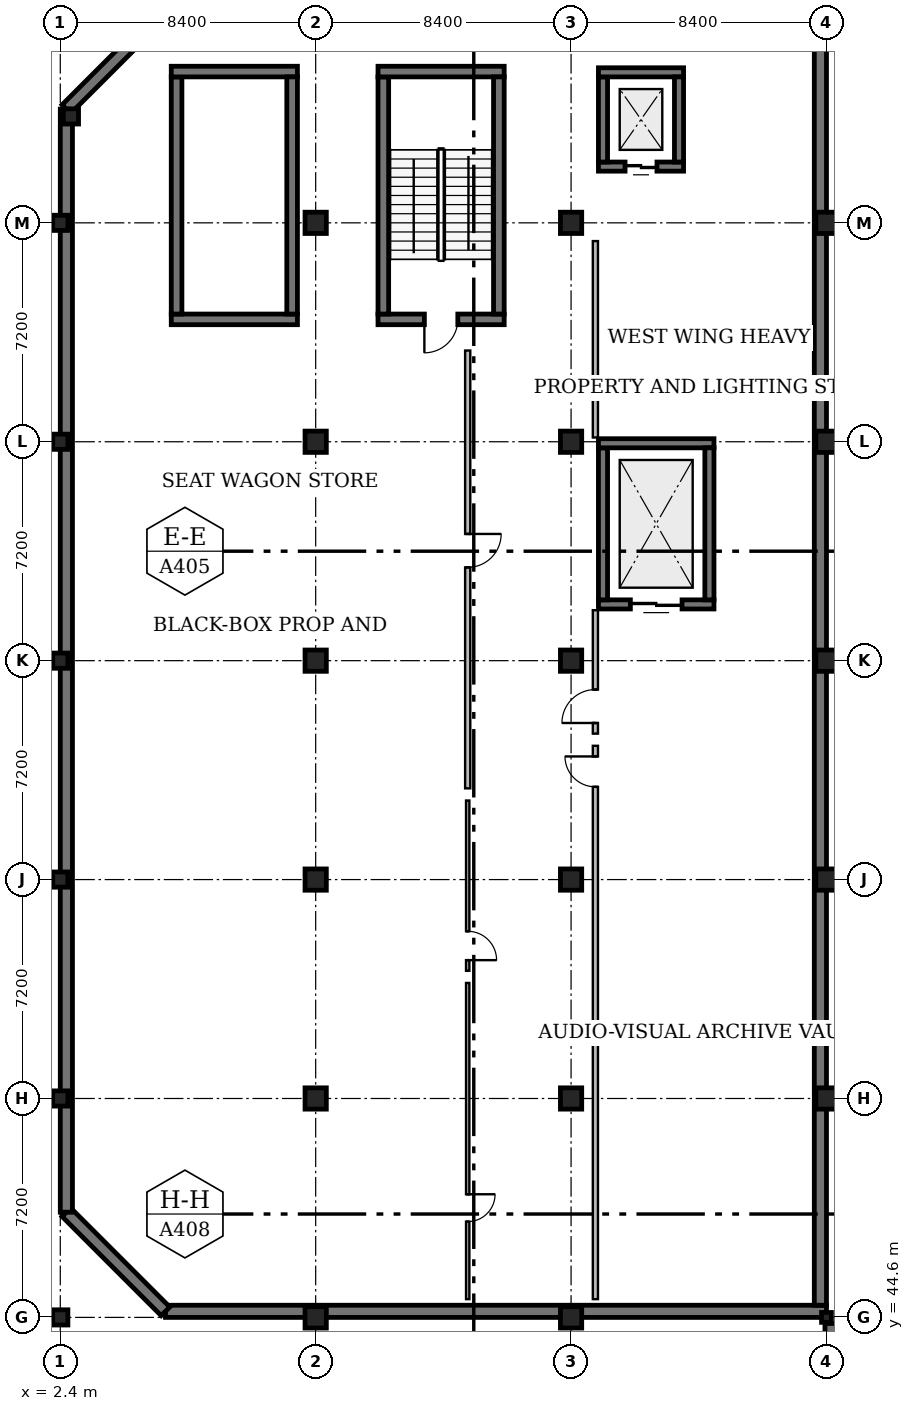
"""IFC4 building model, lengths in metres.
Left out: names, types, materials, properties, quantities, classifications, styles, units other than length and angle.
Written with IfcOpenShell. Run it as: python <this file> out.ifc"""

import sys

from ifc_helpers import new_model, si_unit, direction, frame, frame_2d, origin, origin_2d, place, context, subcontext, project, spatial, rectangle, hollow_circle, extrude, element, fill, save


model = new_model("IFC4")
c1 = context("Model", 3, precision=1e-05, world=origin(), true_north=direction((0.0, 1.0)))
c2 = subcontext(c1, "Body", "Model", "MODEL_VIEW")
j1 = project(units=[si_unit("LENGTHUNIT", "METRE"), si_unit("PLANEANGLEUNIT", "RADIAN")], contexts=[c1])
p1 = place(None, origin())
s1 = spatial("IfcSite", under=j1, at=p1, CompositionType="ELEMENT")
p2 = place(p1, origin())
s2 = spatial("IfcBuilding", under=s1, at=p2, CompositionType="ELEMENT")
p3 = place(p2, frame((0.0, 0.0, -4.8)))
s3 = spatial("IfcBuildingStorey", under=s2, at=p3, CompositionType="ELEMENT", Elevation=-4.8)
for number, where, z_axis, x_axis in (
    (1, (2.4, 44.6, 0.0), (0.0, 0.0, 1.0), (1.0, 0.0, 0.0)),
    (2, (2.4, 51.8, 0.0), (0.0, 0.0, 1.0), (1.0, 0.0, 0.0)),
    (3, (2.4, 59.0, 0.0), (0.0, 0.0, 1.0), (1.0, 0.0, 0.0)),
    (4, (2.4, 66.2, 0.0), (0.0, 0.0, 1.0), (1.0, 0.0, 0.0)),
    (5, (2.4, 73.4, 0.0), (0.0, 0.0, 1.0), (1.0, 0.0, 0.0)),
    (6, (2.4, 80.6, 0.0), (0.0, 0.0, 1.0), (1.0, 0.0, 0.0)),
):
    element("IfcColumn", number, at=place(p3, frame(where, z_axis=z_axis, x_axis=x_axis)), inside=s3, PredefinedType="COLUMN", context=c2, shape_type="SweptSolid", body=[
        extrude(rectangle(XDim=0.5, YDim=0.5, at=origin_2d()), origin(), (0.0, 0.0, 1.0), 4.8),
    ])
for number, where, z_axis, x_axis in (
    (7, (10.8, 44.6, 0.0), (0.0, 0.0, 1.0), (1.0, 0.0, 0.0)),
    (8, (10.8, 51.8, 0.0), (0.0, 0.0, 1.0), (1.0, 0.0, 0.0)),
    (9, (10.8, 59.0, 0.0), (0.0, 0.0, 1.0), (1.0, 0.0, 0.0)),
    (10, (10.8, 66.2, 0.0), (0.0, 0.0, 1.0), (1.0, 0.0, 0.0)),
    (11, (10.8, 73.4, 0.0), (0.0, 0.0, 1.0), (1.0, 0.0, 0.0)),
    (12, (10.8, 80.6, 0.0), (0.0, 0.0, 1.0), (1.0, 0.0, 0.0)),
    (13, (19.2, 44.6, 0.0), (0.0, 0.0, 1.0), (1.0, 0.0, 0.0)),
    (14, (19.2, 51.8, 0.0), (0.0, 0.0, 1.0), (1.0, 0.0, 0.0)),
    (15, (19.2, 59.0, 0.0), (0.0, 0.0, 1.0), (1.0, 0.0, 0.0)),
    (16, (19.2, 66.2, 0.0), (0.0, 0.0, 1.0), (1.0, 0.0, 0.0)),
    (17, (19.2, 73.4, 0.0), (0.0, 0.0, 1.0), (1.0, 0.0, 0.0)),
    (18, (19.2, 80.6, 0.0), (0.0, 0.0, 1.0), (1.0, 0.0, 0.0)),
):
    element("IfcColumn", number, at=place(p3, frame(where, z_axis=z_axis, x_axis=x_axis)), inside=s3, PredefinedType="COLUMN", context=c2, shape_type="SweptSolid", body=[
        extrude(rectangle(XDim=0.7, YDim=0.7, at=origin_2d()), origin(), (0.0, 0.0, 1.0), 4.8),
    ])
p4 = place(p3, frame((27.6, 44.6, 0.0), z_axis=(0.0, 0.0, 1.0), x_axis=(1.0, 0.0, 0.0)))
e19 = element("IfcColumn", 19, at=p4, inside=s3, PredefinedType="COLUMN", context=c2, shape_type="SweptSolid", body=[
    extrude(hollow_circle(Radius=0.162, WallThickness=0.012, at=origin_2d()), origin(), (0.0, 0.0, 1.0), 4.8),
])
for number, where, z_axis, x_axis in (
    (20, (27.6, 51.8, 0.0), (0.0, 0.0, 1.0), (1.0, 0.0, 0.0)),
    (21, (27.6, 59.0, 0.0), (0.0, 0.0, 1.0), (1.0, 0.0, 0.0)),
    (22, (27.6, 66.2, 0.0), (0.0, 0.0, 1.0), (1.0, 0.0, 0.0)),
    (23, (27.6, 73.4, 0.0), (0.0, 0.0, 1.0), (1.0, 0.0, 0.0)),
    (24, (27.6, 80.6, 0.0), (0.0, 0.0, 1.0), (1.0, 0.0, 0.0)),
):
    element("IfcColumn", number, at=place(p3, frame(where, z_axis=z_axis, x_axis=x_axis)), inside=s3, PredefinedType="COLUMN", context=c2, shape_type="SweptSolid", body=[
        extrude(rectangle(XDim=0.7, YDim=0.7, at=origin_2d()), origin(), (0.0, 0.0, 1.0), 4.8),
    ])
p5 = place(p3, frame((2.75, 84.1, 0.0), z_axis=(0.0, 0.0, 1.0), x_axis=(1.0, 0.0, 0.0)))
e25 = element("IfcColumn", 25, at=p5, inside=s3, PredefinedType="COLUMN", context=c2, shape_type="SweptSolid", body=[
    extrude(rectangle(XDim=0.5, YDim=0.5, at=origin_2d()), origin(), (0.0, 0.0, 1.0), 4.8),
])
p6 = place(p3, frame((10.2, 77.425, 0.0), z_axis=(0.0, 0.0, 1.0), x_axis=(-1.0, 0.0, 0.0)))
e26 = element("IfcWall", 26, at=p6, inside=s3, PredefinedType="SOLIDWALL", context=c2, shape_type="SweptSolid", body=[
    extrude(rectangle(XDim=4.15, YDim=0.35, at=frame_2d((2.075, 0.0))), origin(), (0.0, 0.0, 1.0), 4.54),
])
p7 = place(p3, frame((6.225, 77.6, 0.0), z_axis=(0.0, 0.0, 1.0), x_axis=(0.0, 1.0, 0.0)))
e27 = element("IfcWall", 27, at=p7, inside=s3, PredefinedType="SOLIDWALL", context=c2, shape_type="SweptSolid", body=[
    extrude(rectangle(XDim=7.8, YDim=0.35, at=frame_2d((3.9, 0.0))), origin(), (0.0, 0.0, 1.0), 4.54),
])
p8 = place(p3, frame((6.05, 85.575, 0.0), z_axis=(0.0, 0.0, 1.0), x_axis=(1.0, 0.0, 0.0)))
e28 = element("IfcWall", 28, at=p8, inside=s3, PredefinedType="SOLIDWALL", context=c2, shape_type="SweptSolid", body=[
    extrude(rectangle(XDim=4.15, YDim=0.35, at=frame_2d((2.075, 0.0))), origin(), (0.0, 0.0, 1.0), 4.54),
])
p9 = place(p3, frame((10.025, 85.4, 0.0), z_axis=(0.0, 0.0, 1.0), x_axis=(0.0, -1.0, 0.0)))
e29 = element("IfcWall", 29, at=p9, inside=s3, PredefinedType="SOLIDWALL", context=c2, shape_type="SweptSolid", body=[
    extrude(rectangle(XDim=7.8, YDim=0.35, at=frame_2d((3.9, 0.0))), origin(), (0.0, 0.0, 1.0), 4.54),
])
p10 = place(p3, frame((17.0, 77.425, 0.0), z_axis=(0.0, 0.0, 1.0), x_axis=(-1.0, 0.0, 0.0)))
e30 = element("IfcWall", 30, at=p10, inside=s3, PredefinedType="SOLIDWALL", context=c2, shape_type="SweptSolid", body=[
    extrude(rectangle(XDim=4.15, YDim=0.35, at=frame_2d((2.075, 0.0))), origin(), (0.0, 0.0, 1.0), 4.56),
])
p11 = place(p10, frame((1.525, 0.0, 0.0)))
e31 = element("IfcOpeningElement", 31, at=p11, cuts=e30, PredefinedType="OPENING", context=c2, shape_type="SweptSolid", body=[
    extrude(rectangle(XDim=1.1, YDim=2.15, at=frame_2d((0.55, 1.075))), frame((0.0, 0.195, 0.0), z_axis=(0.0, -1.0, 0.0), x_axis=(1.0, 0.0, 0.0)), (0.0, 0.0, 1.0), 0.39),
])
p12 = place(p3, frame((13.025, 77.6, 0.0), z_axis=(0.0, 0.0, 1.0), x_axis=(0.0, 1.0, 0.0)))
e32 = element("IfcWall", 32, at=p12, inside=s3, PredefinedType="SOLIDWALL", context=c2, shape_type="SweptSolid", body=[
    extrude(rectangle(XDim=7.8, YDim=0.35, at=frame_2d((3.9, 0.0))), origin(), (0.0, 0.0, 1.0), 4.56),
])
p13 = place(p3, frame((12.85, 85.575, 0.0), z_axis=(0.0, 0.0, 1.0), x_axis=(1.0, 0.0, 0.0)))
e33 = element("IfcWall", 33, at=p13, inside=s3, PredefinedType="SOLIDWALL", context=c2, shape_type="SweptSolid", body=[
    extrude(rectangle(XDim=4.15, YDim=0.35, at=frame_2d((2.075, 0.0))), origin(), (0.0, 0.0, 1.0), 4.56),
])
p14 = place(p3, frame((16.825, 85.4, 0.0), z_axis=(0.0, 0.0, 1.0), x_axis=(0.0, -1.0, 0.0)))
e34 = element("IfcWall", 34, at=p14, inside=s3, PredefinedType="SOLIDWALL", context=c2, shape_type="SweptSolid", body=[
    extrude(rectangle(XDim=7.8, YDim=0.35, at=frame_2d((3.9, 0.0))), origin(), (0.0, 0.0, 1.0), 4.56),
])
p15 = place(p3, frame((22.9, 82.45, 0.0), z_axis=(0.0, 0.0, 1.0), x_axis=(-1.0, 0.0, 0.0)))
e35 = element("IfcWall", 35, at=p15, inside=s3, PredefinedType="SOLIDWALL", context=c2, shape_type="SweptSolid", body=[
    extrude(rectangle(XDim=2.8, YDim=0.3, at=frame_2d((1.4, 0.0))), origin(), (0.0, 0.0, 1.0), 4.8),
])
p16 = place(p15, frame((0.875, 0.0, 0.0)))
e36 = element("IfcOpeningElement", 36, at=p16, cuts=e35, PredefinedType="OPENING", context=c2, shape_type="SweptSolid", body=[
    extrude(rectangle(XDim=1.05, YDim=2.15, at=frame_2d((0.525, 1.075))), frame((0.0, 0.17, 0.0), z_axis=(0.0, -1.0, 0.0), x_axis=(1.0, 0.0, 0.0)), (0.0, 0.0, 1.0), 0.34),
])
for number, where, z_axis, x_axis in (
    (37, (20.25, 82.6, 0.0), (0.0, 0.0, 1.0), (0.0, 1.0, 0.0)),
    (38, (20.1, 85.55, 0.0), (0.0, 0.0, 1.0), (1.0, 0.0, 0.0)),
    (39, (22.75, 85.4, 0.0), (0.0, 0.0, 1.0), (0.0, -1.0, 0.0)),
):
    element("IfcWall", number, at=place(p3, frame(where, z_axis=z_axis, x_axis=x_axis)), inside=s3, PredefinedType="SOLIDWALL", context=c2, shape_type="SweptSolid", body=[
        extrude(rectangle(XDim=2.8, YDim=0.3, at=frame_2d((1.4, 0.0))), origin(), (0.0, 0.0, 1.0), 4.8),
    ])
p17 = place(p3, frame((23.9, 68.05, 0.0), z_axis=(0.0, 0.0, 1.0), x_axis=(-1.0, 0.0, 0.0)))
e40 = element("IfcWall", 40, at=p17, inside=s3, PredefinedType="SOLIDWALL", context=c2, shape_type="SweptSolid", body=[
    extrude(rectangle(XDim=3.8, YDim=0.3, at=frame_2d((1.9, 0.0))), origin(), (0.0, 0.0, 1.0), 4.8),
])
p18 = place(p17, frame((1.05, 0.0, 0.0)))
e41 = element("IfcOpeningElement", 41, at=p18, cuts=e40, PredefinedType="OPENING", context=c2, shape_type="SweptSolid", body=[
    extrude(rectangle(XDim=1.7, YDim=2.4, at=frame_2d((0.85, 1.2))), frame((0.0, 0.17, 0.0), z_axis=(0.0, -1.0, 0.0), x_axis=(1.0, 0.0, 0.0)), (0.0, 0.0, 1.0), 0.34),
])
p19 = place(p3, frame((20.25, 68.2, 0.0), z_axis=(0.0, 0.0, 1.0), x_axis=(0.0, 1.0, 0.0)))
e42 = element("IfcWall", 42, at=p19, inside=s3, PredefinedType="SOLIDWALL", context=c2, shape_type="SweptSolid", body=[
    extrude(rectangle(XDim=5.0, YDim=0.3, at=frame_2d((2.5, 0.0))), origin(), (0.0, 0.0, 1.0), 4.8),
])
p20 = place(p3, frame((20.1, 73.35, 0.0), z_axis=(0.0, 0.0, 1.0), x_axis=(1.0, 0.0, 0.0)))
e43 = element("IfcWall", 43, at=p20, inside=s3, PredefinedType="SOLIDWALL", context=c2, shape_type="SweptSolid", body=[
    extrude(rectangle(XDim=3.8, YDim=0.3, at=frame_2d((1.9, 0.0))), origin(), (0.0, 0.0, 1.0), 4.8),
])
p21 = place(p3, frame((23.75, 73.2, 0.0), z_axis=(0.0, 0.0, 1.0), x_axis=(0.0, -1.0, 0.0)))
e44 = element("IfcWall", 44, at=p21, inside=s3, PredefinedType="SOLIDWALL", context=c2, shape_type="SweptSolid", body=[
    extrude(rectangle(XDim=5.0, YDim=0.3, at=frame_2d((2.5, 0.0))), origin(), (0.0, 0.0, 1.0), 4.8),
])
p22 = place(p3, frame((27.75, 1.58, 0.0), z_axis=(0.0, 0.0, 1.0), x_axis=(0.0, 1.0, 0.0)))
e45 = element("IfcWall", 45, at=p22, inside=s3, PredefinedType="SOLIDWALL", context=c2, shape_type="SweptSolid", body=[
    extrude(rectangle(XDim=42.82, YDim=0.4, at=frame_2d((21.41, 0.0))), origin(), (0.0, 0.0, 1.0), 4.63),
])
p23 = place(p3, frame((5.86, 44.8, 0.0), z_axis=(0.0, 0.0, 1.0), x_axis=(1.0, 0.0, 0.0)))
e46 = element("IfcWall", 46, at=p23, inside=s3, PredefinedType="SOLIDWALL", context=c2, shape_type="SweptSolid", body=[
    extrude(rectangle(XDim=21.74, YDim=0.4, at=frame_2d((10.87, 0.0))), origin(), (0.0, 0.0, 1.0), 4.48),
])
p24 = place(p3, frame((2.6, 48.06, 0.0), z_axis=(0.0, 0.0, 1.0), x_axis=(0.707106781187, -0.707106781187, 0.0)))
e47 = element("IfcWall", 47, at=p24, inside=s3, PredefinedType="SOLIDWALL", context=c2, shape_type="SweptSolid", body=[
    extrude(rectangle(XDim=4.61, YDim=0.4, at=frame_2d((2.305, 0.0))), origin(), (0.0, 0.0, 1.0), 4.48),
])
p25 = place(p3, frame((2.6, 48.06, 0.0), z_axis=(0.0, 0.0, 1.0), x_axis=(0.0, 1.0, 0.0)))
e48 = element("IfcWall", 48, at=p25, inside=s3, PredefinedType="SOLIDWALL", context=c2, shape_type="SweptSolid", body=[
    extrude(rectangle(XDim=36.28, YDim=0.4, at=frame_2d((18.14, 0.0))), origin(), (0.0, 0.0, 1.0), 4.48),
])
p26 = place(p3, frame((2.6, 84.34, 0.0), z_axis=(0.0, 0.0, 1.0), x_axis=(0.707106781187, 0.707106781187, 0.0)))
e49 = element("IfcWall", 49, at=p26, inside=s3, PredefinedType="SOLIDWALL", context=c2, shape_type="SweptSolid", body=[
    extrude(rectangle(XDim=4.61, YDim=0.4, at=frame_2d((2.305, 0.0))), origin(), (0.0, 0.0, 1.0), 4.48),
])
p27 = place(p3, frame((27.4, 45.0, 0.0), z_axis=(0.0, 0.0, 1.0), x_axis=(0.0, 1.0, 0.0)))
e50 = element("IfcWall", 50, at=p27, inside=s3, PredefinedType="SOLIDWALL", context=c2, shape_type="SweptSolid", body=[
    extrude(rectangle(XDim=42.4, YDim=0.4, at=frame_2d((21.2, 0.0))), origin(), (0.0, 0.0, 1.0), 4.48),
])
p28 = place(p3, frame((15.8, 55.6, 0.0), z_axis=(0.0, 0.0, 1.0), x_axis=(0.0, -1.0, 0.0)))
e51 = element("IfcWall", 51, at=p28, inside=s3, PredefinedType="PARTITIONING", context=c2, shape_type="SweptSolid", body=[
    extrude(rectangle(XDim=10.4, YDim=0.11, at=frame_2d((5.2, 0.0))), origin(), (0.0, 0.0, 1.0), 4.54),
])
p29 = place(p28, frame((6.95, 0.0, 0.0)))
e52 = element("IfcOpeningElement", 52, at=p29, cuts=e51, PredefinedType="OPENING", context=c2, shape_type="SweptSolid", body=[
    extrude(rectangle(XDim=0.9, YDim=2.15, at=frame_2d((0.45, 1.075))), frame((0.0, 0.075, 0.0), z_axis=(0.0, -1.0, 0.0), x_axis=(1.0, 0.0, 0.0)), (0.0, 0.0, 1.0), 0.15),
])
p30 = place(p3, frame((15.8, 61.6, 0.0), z_axis=(0.0, 0.0, 1.0), x_axis=(0.0, -1.0, 0.0)))
e53 = element("IfcWall", 53, at=p30, inside=s3, PredefinedType="PARTITIONING", context=c2, shape_type="SweptSolid", body=[
    extrude(rectangle(XDim=5.6, YDim=0.11, at=frame_2d((2.8, 0.0))), origin(), (0.0, 0.0, 1.0), 4.54),
])
p31 = place(p30, frame((4.3, 0.0, 0.0)))
e54 = element("IfcOpeningElement", 54, at=p31, cuts=e53, PredefinedType="OPENING", context=c2, shape_type="SweptSolid", body=[
    extrude(rectangle(XDim=0.95, YDim=2.1, at=frame_2d((0.475, 1.05))), frame((0.0, 0.075, 0.0), z_axis=(0.0, -1.0, 0.0), x_axis=(1.0, 0.0, 0.0)), (0.0, 0.0, 1.0), 0.15),
])
p32 = place(p3, frame((15.8, 76.4, 0.0), z_axis=(0.0, 0.0, 1.0), x_axis=(0.0, -1.0, 0.0)))
e55 = element("IfcWall", 55, at=p32, inside=s3, PredefinedType="PARTITIONING", context=c2, shape_type="SweptSolid", body=[
    extrude(rectangle(XDim=14.4, YDim=0.17, at=frame_2d((7.2, 0.0))), origin(), (0.0, 0.0, 1.0), 4.54),
])
p33 = place(p32, frame((6.032, 0.0, 0.0)))
e56 = element("IfcOpeningElement", 56, at=p33, cuts=e55, PredefinedType="OPENING", context=c2, shape_type="SweptSolid", body=[
    extrude(rectangle(XDim=1.1, YDim=2.1, at=frame_2d((0.55, 1.05))), frame((0.0, 0.105, 0.0), z_axis=(0.0, -1.0, 0.0), x_axis=(1.0, 0.0, 0.0)), (0.0, 0.0, 1.0), 0.21),
])
p34 = place(p3, frame((20.0, 45.2, 0.0), z_axis=(0.0, 0.0, 1.0), x_axis=(0.0, 1.0, 0.0)))
e57 = element("IfcWall", 57, at=p34, inside=s3, PredefinedType="PARTITIONING", context=c2, shape_type="SweptSolid", body=[
    extrude(rectangle(XDim=18.2, YDim=0.17, at=frame_2d((9.1, 0.0))), origin(), (0.0, 0.0, 1.0), 4.54),
])
p35 = place(p34, frame((16.85, 0.0, 0.0)))
e58 = element("IfcOpeningElement", 58, at=p35, cuts=e57, PredefinedType="OPENING", context=c2, shape_type="SweptSolid", body=[
    extrude(rectangle(XDim=1.0, YDim=2.2, at=frame_2d((0.5, 1.1))), frame((0.0, 0.105, 0.0), z_axis=(0.0, -1.0, 0.0), x_axis=(1.0, 0.0, 0.0)), (0.0, 0.0, 1.0), 0.21),
])
p36 = place(p3, frame((20.0, 63.8, 0.0), z_axis=(0.0, 0.0, 1.0), x_axis=(0.0, 1.0, 0.0)))
e59 = element("IfcWall", 59, at=p36, inside=s3, PredefinedType="PARTITIONING", context=c2, shape_type="SweptSolid", body=[
    extrude(rectangle(XDim=4.06, YDim=0.17, at=frame_2d((2.03, 0.0))), origin(), (0.0, 0.0, 1.0), 4.54),
])
p37 = place(p36, frame((0.35, 0.0, 0.0)))
e60 = element("IfcOpeningElement", 60, at=p37, cuts=e59, PredefinedType="OPENING", context=c2, shape_type="SweptSolid", body=[
    extrude(rectangle(XDim=1.1, YDim=2.1, at=frame_2d((0.55, 1.05))), frame((0.0, 0.105, 0.0), z_axis=(0.0, -1.0, 0.0), x_axis=(1.0, 0.0, 0.0)), (0.0, 0.0, 1.0), 0.21),
])
p38 = place(p3, frame((20.0, 73.54, 0.0), z_axis=(0.0, 0.0, 1.0), x_axis=(0.0, 1.0, 0.0)))
e61 = element("IfcWall", 61, at=p38, inside=s3, PredefinedType="PARTITIONING", context=c2, shape_type="SweptSolid", body=[
    extrude(rectangle(XDim=6.46, YDim=0.17, at=frame_2d((3.23, 0.0))), origin(), (0.0, 0.0, 1.0), 4.54),
])
p39 = place(p11, origin())
e62 = element("IfcDoor", 62, at=p39, inside=s3, OperationType="SINGLE_SWING_RIGHT", PredefinedType="DOOR", context=c2, shape_type="SweptSolid", body=[
    extrude(rectangle(XDim=1.1, YDim=2.15, at=frame_2d((0.55, 1.075))), frame((0.0, 0.025, 0.0), z_axis=(0.0, -1.0, 0.0), x_axis=(1.0, 0.0, 0.0)), (0.0, 0.0, 1.0), 0.05),
])
fill(e31, e62)
p40 = place(p16, origin())
e63 = element("IfcDoor", 63, at=p40, inside=s3, OperationType="DOUBLE_DOOR_SLIDING", PredefinedType="DOOR", context=c2, shape_type="SweptSolid", body=[
    extrude(rectangle(XDim=1.05, YDim=2.15, at=frame_2d((0.525, 1.075))), frame((0.0, 0.025, 0.0), z_axis=(0.0, -1.0, 0.0), x_axis=(1.0, 0.0, 0.0)), (0.0, 0.0, 1.0), 0.05),
])
fill(e36, e63)
p41 = place(p18, origin())
e64 = element("IfcDoor", 64, at=p41, inside=s3, OperationType="DOUBLE_DOOR_SLIDING", PredefinedType="DOOR", context=c2, shape_type="SweptSolid", body=[
    extrude(rectangle(XDim=1.7, YDim=2.4, at=frame_2d((0.85, 1.2))), frame((0.0, 0.025, 0.0), z_axis=(0.0, -1.0, 0.0), x_axis=(1.0, 0.0, 0.0)), (0.0, 0.0, 1.0), 0.05),
])
fill(e41, e64)
p42 = place(p29, origin())
e65 = element("IfcDoor", 65, at=p42, inside=s3, OperationType="SINGLE_SWING_LEFT", PredefinedType="DOOR", context=c2, shape_type="SweptSolid", body=[
    extrude(rectangle(XDim=0.9, YDim=2.15, at=frame_2d((0.45, 1.075))), frame((0.0, 0.025, 0.0), z_axis=(0.0, -1.0, 0.0), x_axis=(1.0, 0.0, 0.0)), (0.0, 0.0, 1.0), 0.05),
])
fill(e52, e65)
p43 = place(p31, origin())
e66 = element("IfcDoor", 66, at=p43, inside=s3, OperationType="SINGLE_SWING_RIGHT", PredefinedType="DOOR", context=c2, shape_type="SweptSolid", body=[
    extrude(rectangle(XDim=0.95, YDim=2.1, at=frame_2d((0.475, 1.05))), frame((0.0, 0.025, 0.0), z_axis=(0.0, -1.0, 0.0), x_axis=(1.0, 0.0, 0.0)), (0.0, 0.0, 1.0), 0.05),
])
fill(e54, e66)
p44 = place(p33, origin())
e67 = element("IfcDoor", 67, at=p44, inside=s3, OperationType="SINGLE_SWING_LEFT", PredefinedType="DOOR", context=c2, shape_type="SweptSolid", body=[
    extrude(rectangle(XDim=1.1, YDim=2.1, at=frame_2d((0.55, 1.05))), frame((0.0, 0.025, 0.0), z_axis=(0.0, -1.0, 0.0), x_axis=(1.0, 0.0, 0.0)), (0.0, 0.0, 1.0), 0.05),
])
fill(e56, e67)
p45 = place(p35, origin())
e68 = element("IfcDoor", 68, at=p45, inside=s3, OperationType="SINGLE_SWING_RIGHT", PredefinedType="DOOR", context=c2, shape_type="SweptSolid", body=[
    extrude(rectangle(XDim=1.0, YDim=2.2, at=frame_2d((0.5, 1.1))), frame((0.0, 0.025, 0.0), z_axis=(0.0, -1.0, 0.0), x_axis=(1.0, 0.0, 0.0)), (0.0, 0.0, 1.0), 0.05),
])
fill(e58, e68)
p46 = place(p37, origin())
e69 = element("IfcDoor", 69, at=p46, inside=s3, OperationType="SINGLE_SWING_LEFT", PredefinedType="DOOR", context=c2, shape_type="SweptSolid", body=[
    extrude(rectangle(XDim=1.1, YDim=2.1, at=frame_2d((0.55, 1.05))), frame((0.0, 0.025, 0.0), z_axis=(0.0, -1.0, 0.0), x_axis=(1.0, 0.0, 0.0)), (0.0, 0.0, 1.0), 0.05),
])
fill(e60, e69)
save(model, sys.argv[1])
